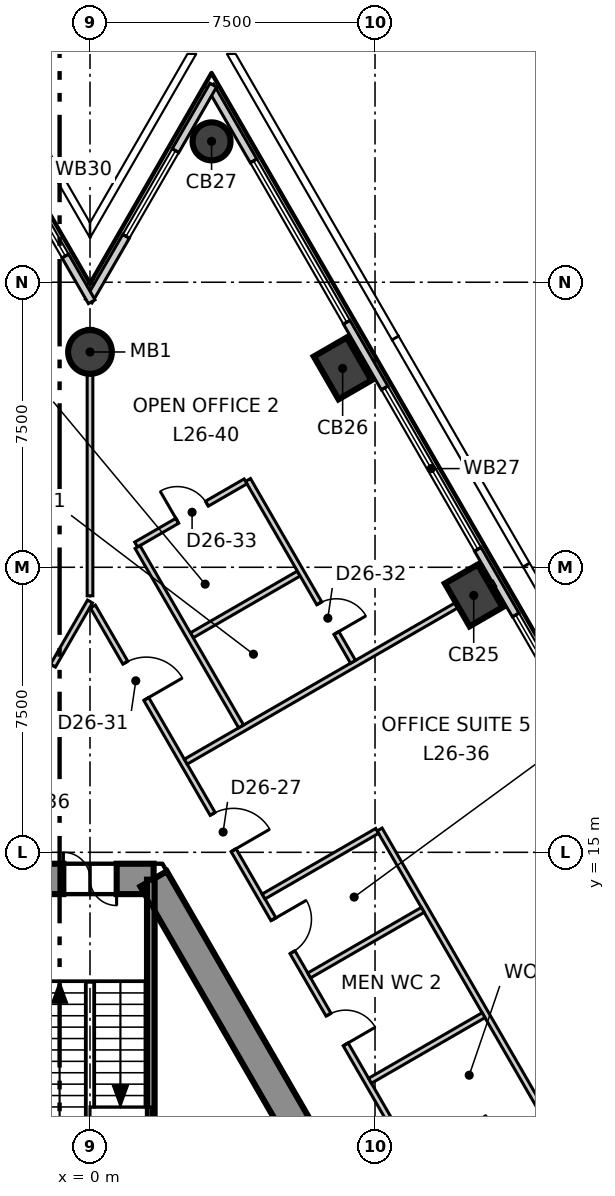
"""IFC4 building model, lengths in metres.
Left out: names, types, materials, properties, quantities, classifications, styles, units other than length and angle.
Written with IfcOpenShell. Run it as: python <this file> out.ifc"""

import sys

from ifc_helpers import new_model, si_unit, direction, frame, frame_2d, origin, origin_2d, place, context, subcontext, project, spatial, polyline, rectangle, circle, outline, extrude, element, fill, save


model = new_model("IFC4")
c1 = context("Model", 3, precision=1e-05, world=origin(), true_north=direction((0.0, 1.0)))
c2 = subcontext(c1, "Body", "Model", "MODEL_VIEW")
j1 = project(units=[si_unit("LENGTHUNIT", "METRE"), si_unit("PLANEANGLEUNIT", "RADIAN")], contexts=[c1])
p1 = place(None, origin())
s1 = spatial("IfcSite", under=j1, at=p1, CompositionType="ELEMENT")
p2 = place(p1, origin())
s2 = spatial("IfcBuilding", under=s1, at=p2, CompositionType="ELEMENT")
p3 = place(p2, frame((0.0, 0.0, 116.3)))
s3 = spatial("IfcBuildingStorey", under=s2, at=p3, CompositionType="ELEMENT", Elevation=116.3)
p4 = place(p3, frame((1.674, 14.3, -0.3), z_axis=(0.0, 0.0, 1.0), x_axis=(-1.0, 0.0, 0.0)))
e1 = element("IfcWall", 1, at=p4, inside=s3, PredefinedType="SHEAR", context=c2, shape_type="SweptSolid", body=[
    extrude(outline(polyline([(-0.231, -0.4), (1.674, -0.4), (3.579, -0.4), (3.117, 0.4), (1.674, 0.4), (0.231, 0.4), (-0.231, -0.4)])), origin(), (0.0, 0.0, 1.0), 4.0),
])
p5 = place(p4, frame((0.974, 0.0, 0.3)))
e2 = element("IfcOpeningElement", 2, at=p5, cuts=e1, PredefinedType="OPENING", context=c2, shape_type="SweptSolid", body=[
    extrude(rectangle(XDim=1.4, YDim=2.1, at=frame_2d((0.7, 1.05))), frame((0.0, 0.41, 0.0), z_axis=(0.0, -1.0, 0.0), x_axis=(1.0, 0.0, 0.0)), (0.0, 0.0, 1.0), 0.82),
])
p6 = place(p3, frame((13.221, -5.7, -0.3), z_axis=(0.0, 0.0, 1.0), x_axis=(-0.499995765644, 0.866027848477, 0.0)))
e3 = element("IfcWall", 3, at=p6, inside=s3, PredefinedType="SHEAR", context=c2, shape_type="SweptSolid", body=[
    extrude(outline(polyline([(-0.231, -0.4), (1.732, -0.4), (3.695, -0.4), (5.658, -0.4), (7.621, -0.4), (9.584, -0.4), (11.547, -0.4), (13.51, -0.4), (15.473, -0.4), (17.436, -0.4), (19.399, -0.4), (21.362, -0.4), (23.325, -0.4), (22.863, 0.4), (20.977, 0.4), (19.091, 0.4), (17.205, 0.4), (15.319, 0.4), (13.433, 0.4), (11.547, 0.4), (9.661, 0.4), (7.775, 0.4), (5.889, 0.4), (4.003, 0.4), (2.117, 0.4), (0.231, 0.4), (-0.231, -0.4)])), origin(), (0.0, 0.0, 1.0), 4.0),
])
p7 = place(p6, frame((10.647, 0.0, 0.3)))
e4 = element("IfcOpeningElement", 4, at=p7, cuts=e3, PredefinedType="OPENING", context=c2, shape_type="SweptSolid", body=[
    extrude(rectangle(XDim=1.8, YDim=2.1, at=frame_2d((0.9, 1.05))), frame((0.0, 0.41, 0.0), z_axis=(0.0, -1.0, 0.0), x_axis=(1.0, 0.0, 0.0)), (0.0, 0.0, 1.0), 0.82),
])
for number, where, z_axis, x_axis in (
    (5, (10.097, 21.76, -0.3), (0.0, 0.0, 1.0), (-0.5, 0.866, 0.0)),
    (6, (6.648, 27.733, -0.3), (0.0, 0.0, 1.0), (-0.5, 0.866, 0.0)),
):
    element("IfcColumn", number, at=place(p3, frame(where, z_axis=z_axis, x_axis=x_axis)), inside=s3, PredefinedType="COLUMN", context=c2, shape_type="SweptSolid", body=[
        extrude(rectangle(XDim=1.3, YDim=1.0, at=origin_2d()), origin(), (0.0, 0.0, 1.0), 4.0),
    ])
p8 = place(p3, frame((3.199, 33.707, -0.3), z_axis=(0.0, 0.0, 1.0), x_axis=(-0.5, 0.866025403784, 0.0)))
e7 = element("IfcColumn", 7, at=p8, inside=s3, PredefinedType="COLUMN", context=c2, shape_type="SweptSolid", body=[
    extrude(circle(Radius=0.5, at=origin_2d()), origin(), (0.0, 0.0, 1.0), 4.0),
])
p9 = place(p3, frame((0.0, 28.165, -0.3), z_axis=(0.0, 0.0, 1.0), x_axis=(1.0, 0.0, 0.0)))
e8 = element("IfcColumn", 8, at=p9, inside=s3, PredefinedType="COLUMN", context=c2, shape_type="SweptSolid", body=[
    extrude(circle(Radius=0.575, at=origin_2d()), origin(), (0.0, 0.0, 1.0), 4.0),
])
p10 = place(p3, frame((32.048, -14.861, 0.0), z_axis=(0.0, 0.0, 1.0), x_axis=(-0.499996704161, 0.866027306629, 0.0)))
e9 = element("IfcWall", 9, at=p10, inside=s3, PredefinedType="ELEMENTEDWALL", context=c2, shape_type="SweptSolid", body=[
    extrude(rectangle(XDim=57.769, YDim=0.2, at=frame_2d((28.884, 0.0))), origin(), (0.0, 0.0, 1.0), 3.7),
])
p11 = place(p10, frame((2.302, 0.0, 0.9)))
e10 = element("IfcOpeningElement", 10, at=p11, cuts=e9, PredefinedType="OPENING", context=c2, shape_type="SweptSolid", body=[
    extrude(rectangle(XDim=4.9, YDim=2.5, at=frame_2d((2.45, 1.25))), frame((0.0, 0.11, 0.0), z_axis=(0.0, -1.0, 0.0), x_axis=(1.0, 0.0, 0.0)), (0.0, 0.0, 1.0), 0.22),
])
p12 = place(p10, frame((9.199, 0.0, 0.9)))
e11 = element("IfcOpeningElement", 11, at=p12, cuts=e9, PredefinedType="OPENING", context=c2, shape_type="SweptSolid", body=[
    extrude(rectangle(XDim=4.9, YDim=2.5, at=frame_2d((2.45, 1.25))), frame((0.0, 0.11, 0.0), z_axis=(0.0, -1.0, 0.0), x_axis=(1.0, 0.0, 0.0)), (0.0, 0.0, 1.0), 0.22),
])
p13 = place(p10, frame((16.097, 0.0, 0.9)))
e12 = element("IfcOpeningElement", 12, at=p13, cuts=e9, PredefinedType="OPENING", context=c2, shape_type="SweptSolid", body=[
    extrude(rectangle(XDim=4.9, YDim=2.5, at=frame_2d((2.45, 1.25))), frame((0.0, 0.11, 0.0), z_axis=(0.0, -1.0, 0.0), x_axis=(1.0, 0.0, 0.0)), (0.0, 0.0, 1.0), 0.22),
])
p14 = place(p10, frame((22.995, 0.0, 0.9)))
e13 = element("IfcOpeningElement", 13, at=p14, cuts=e9, PredefinedType="OPENING", context=c2, shape_type="SweptSolid", body=[
    extrude(rectangle(XDim=4.9, YDim=2.5, at=frame_2d((2.45, 1.25))), frame((0.0, 0.11, 0.0), z_axis=(0.0, -1.0, 0.0), x_axis=(1.0, 0.0, 0.0)), (0.0, 0.0, 1.0), 0.22),
])
p15 = place(p10, frame((29.893, 0.0, 0.9)))
e14 = element("IfcOpeningElement", 14, at=p15, cuts=e9, PredefinedType="OPENING", context=c2, shape_type="SweptSolid", body=[
    extrude(rectangle(XDim=4.9, YDim=2.5, at=frame_2d((2.45, 1.25))), frame((0.0, 0.11, 0.0), z_axis=(0.0, -1.0, 0.0), x_axis=(1.0, 0.0, 0.0)), (0.0, 0.0, 1.0), 0.22),
])
p16 = place(p10, frame((36.791, 0.0, 0.9)))
e15 = element("IfcOpeningElement", 15, at=p16, cuts=e9, PredefinedType="OPENING", context=c2, shape_type="SweptSolid", body=[
    extrude(rectangle(XDim=4.9, YDim=2.5, at=frame_2d((2.45, 1.25))), frame((0.0, 0.11, 0.0), z_axis=(0.0, -1.0, 0.0), x_axis=(1.0, 0.0, 0.0)), (0.0, 0.0, 1.0), 0.22),
])
p17 = place(p10, frame((43.689, 0.0, 0.9)))
e16 = element("IfcOpeningElement", 16, at=p17, cuts=e9, PredefinedType="OPENING", context=c2, shape_type="SweptSolid", body=[
    extrude(rectangle(XDim=4.9, YDim=2.5, at=frame_2d((2.45, 1.25))), frame((0.0, 0.11, 0.0), z_axis=(0.0, -1.0, 0.0), x_axis=(1.0, 0.0, 0.0)), (0.0, 0.0, 1.0), 0.22),
])
p18 = place(p10, frame((50.587, 0.0, 0.9)))
e17 = element("IfcOpeningElement", 17, at=p18, cuts=e9, PredefinedType="OPENING", context=c2, shape_type="SweptSolid", body=[
    extrude(rectangle(XDim=4.9, YDim=2.5, at=frame_2d((2.45, 1.25))), frame((0.0, 0.11, 0.0), z_axis=(0.0, -1.0, 0.0), x_axis=(1.0, 0.0, 0.0)), (0.0, 0.0, 1.0), 0.22),
])
p19 = place(p3, frame((3.244, 35.185, 0.0), z_axis=(0.0, 0.0, 1.0), x_axis=(-0.499862072928, -0.866105021373, 0.0)))
e18 = element("IfcWall", 18, at=p19, inside=s3, PredefinedType="ELEMENTEDWALL", context=c2, shape_type="SweptSolid", body=[
    extrude(rectangle(XDim=6.559, YDim=0.2, at=frame_2d((3.28, 0.0))), origin(), (0.0, 0.0, 1.0), 3.7),
])
p20 = place(p19, frame((1.99, 0.0, 0.9)))
e19 = element("IfcOpeningElement", 19, at=p20, cuts=e18, PredefinedType="OPENING", context=c2, shape_type="SweptSolid", body=[
    extrude(rectangle(XDim=2.6, YDim=2.5, at=frame_2d((1.3, 1.25))), frame((0.0, 0.11, 0.0), z_axis=(0.0, -1.0, 0.0), x_axis=(1.0, 0.0, 0.0)), (0.0, 0.0, 1.0), 0.22),
])
p21 = place(p3, frame((0.045, 29.487, 0.0), z_axis=(0.0, 0.0, 1.0), x_axis=(-0.499878187048, 0.866095721103, 0.0)))
e20 = element("IfcWall", 20, at=p21, inside=s3, PredefinedType="ELEMENTEDWALL", context=c2, shape_type="SweptSolid", body=[
    extrude(rectangle(XDim=6.559, YDim=0.2, at=frame_2d((3.28, 0.0))), origin(), (0.0, 0.0, 1.0), 3.7),
])
p22 = place(p21, frame((1.39, 0.0, 0.9)))
e21 = element("IfcOpeningElement", 21, at=p22, cuts=e20, PredefinedType="OPENING", context=c2, shape_type="SweptSolid", body=[
    extrude(rectangle(XDim=2.6, YDim=2.5, at=frame_2d((1.3, 1.25))), frame((0.0, 0.11, 0.0), z_axis=(0.0, -1.0, 0.0), x_axis=(1.0, 0.0, 0.0)), (0.0, 0.0, 1.0), 0.22),
])
p23 = place(p3, frame((-5.454, 12.154, 0.0), z_axis=(0.0, 0.0, 1.0), x_axis=(0.500029221456, 0.866008532111, 0.0)))
e22 = element("IfcWall", 22, at=p23, inside=s3, PredefinedType="PARTITIONING", context=c2, shape_type="SweptSolid", body=[
    extrude(rectangle(XDim=10.907, YDim=0.15, at=frame_2d((5.454, 0.0))), origin(), (0.0, 0.0, 1.0), 3.7),
])
p24 = place(p23, frame((7.857, 0.0, 0.0)))
e23 = element("IfcOpeningElement", 23, at=p24, cuts=e22, PredefinedType="OPENING", context=c2, shape_type="SweptSolid", body=[
    extrude(rectangle(XDim=1.1, YDim=2.1, at=frame_2d((0.55, 1.05))), frame((0.0, 0.085, 0.0), z_axis=(0.0, -1.0, 0.0), x_axis=(1.0, 0.0, 0.0)), (0.0, 0.0, 1.0), 0.17),
])
p25 = place(p23, frame((2.248, 0.0, 0.0)))
e24 = element("IfcOpeningElement", 24, at=p25, cuts=e22, PredefinedType="OPENING", context=c2, shape_type="SweptSolid", body=[
    extrude(rectangle(XDim=1.0, YDim=2.1, at=frame_2d((0.5, 1.05))), frame((0.0, 0.085, 0.0), z_axis=(0.0, -1.0, 0.0), x_axis=(1.0, 0.0, 0.0)), (0.0, 0.0, 1.0), 0.17),
])
p26 = place(p23, frame((4.348, 0.0, 0.0)))
e25 = element("IfcOpeningElement", 25, at=p26, cuts=e22, PredefinedType="OPENING", context=c2, shape_type="SweptSolid", body=[
    extrude(rectangle(XDim=0.9, YDim=2.1, at=frame_2d((0.45, 1.05))), frame((0.0, 0.085, 0.0), z_axis=(0.0, -1.0, 0.0), x_axis=(1.0, 0.0, 0.0)), (0.0, 0.0, 1.0), 0.17),
])
p27 = place(p3, frame((0.0, 21.75, 0.0), z_axis=(0.0, 0.0, 1.0), x_axis=(0.0, 1.0, 0.0)))
e26 = element("IfcWall", 26, at=p27, inside=s3, PredefinedType="PARTITIONING", context=c2, shape_type="SweptSolid", body=[
    extrude(rectangle(XDim=7.035, YDim=0.15, at=frame_2d((3.518, 0.0))), origin(), (0.0, 0.0, 1.0), 3.15),
])
p28 = place(p3, frame((0.076, 21.468, 0.0), z_axis=(0.0, 0.0, 1.0), x_axis=(0.500006592492, -0.866021597574, 0.0)))
e27 = element("IfcWall", 27, at=p28, inside=s3, PredefinedType="PARTITIONING", context=c2, shape_type="SweptSolid", body=[
    extrude(rectangle(XDim=17.652, YDim=0.15, at=frame_2d((8.826, 0.0))), origin(), (0.0, 0.0, 1.0), 3.7),
])
p29 = place(p28, frame((6.303, 0.0, 0.0)))
e28 = element("IfcOpeningElement", 28, at=p29, cuts=e27, PredefinedType="OPENING", context=c2, shape_type="SweptSolid", body=[
    extrude(rectangle(XDim=1.1, YDim=2.1, at=frame_2d((0.55, 1.05))), frame((0.0, 0.085, 0.0), z_axis=(0.0, -1.0, 0.0), x_axis=(1.0, 0.0, 0.0)), (0.0, 0.0, 1.0), 0.17),
])
p30 = place(p28, frame((12.403, 0.0, 0.0)))
e29 = element("IfcOpeningElement", 29, at=p30, cuts=e27, PredefinedType="OPENING", context=c2, shape_type="SweptSolid", body=[
    extrude(rectangle(XDim=0.9, YDim=2.1, at=frame_2d((0.45, 1.05))), frame((0.0, 0.085, 0.0), z_axis=(0.0, -1.0, 0.0), x_axis=(1.0, 0.0, 0.0)), (0.0, 0.0, 1.0), 0.17),
])
p31 = place(p28, frame((9.503, 0.0, 0.0)))
e30 = element("IfcOpeningElement", 30, at=p31, cuts=e27, PredefinedType="OPENING", context=c2, shape_type="SweptSolid", body=[
    extrude(rectangle(XDim=1.0, YDim=2.1, at=frame_2d((0.5, 1.05))), frame((0.0, 0.085, 0.0), z_axis=(0.0, -1.0, 0.0), x_axis=(1.0, 0.0, 0.0)), (0.0, 0.0, 1.0), 0.17),
])
p32 = place(p28, frame((1.708, 0.0, 0.0)))
e31 = element("IfcOpeningElement", 31, at=p32, cuts=e27, PredefinedType="OPENING", context=c2, shape_type="SweptSolid", body=[
    extrude(rectangle(XDim=1.1, YDim=2.1, at=frame_2d((0.55, 1.05))), frame((0.0, 0.085, 0.0), z_axis=(0.0, -1.0, 0.0), x_axis=(1.0, 0.0, 0.0)), (0.0, 0.0, 1.0), 0.17),
])
p33 = place(p3, frame((2.52, 17.385, 0.0), z_axis=(0.0, 0.0, 1.0), x_axis=(0.866005502057, 0.500034469219, 0.0)))
e32 = element("IfcWall", 32, at=p33, inside=s3, PredefinedType="PARTITIONING", context=c2, shape_type="SweptSolid", body=[
    extrude(rectangle(XDim=9.369, YDim=0.15, at=frame_2d((4.685, 0.0))), origin(), (0.0, 0.0, 1.0), 3.7),
])
p34 = place(p3, frame((7.621, 15.601, 0.0), z_axis=(0.0, 0.0, 1.0), x_axis=(0.499937230245, -0.866061640887, 0.0)))
e33 = element("IfcWall", 33, at=p34, inside=s3, PredefinedType="PARTITIONING", context=c2, shape_type="SweptSolid", body=[
    extrude(rectangle(XDim=8.725, YDim=0.15, at=frame_2d((4.362, 0.0))), origin(), (0.0, 0.0, 1.0), 3.7),
])
p35 = place(p3, frame((4.568, 13.838, 0.0), z_axis=(0.0, 0.0, 1.0), x_axis=(0.866013532718, 0.500020560727, 0.0)))
e34 = element("IfcWall", 34, at=p35, inside=s3, PredefinedType="PARTITIONING", context=c2, shape_type="SweptSolid", body=[
    extrude(rectangle(XDim=3.45, YDim=0.15, at=frame_2d((1.725, 0.0))), origin(), (0.0, 0.0, 1.0), 3.7),
])
for number, where, z_axis, x_axis in (
    (35, (5.768, 11.76, 0.0), (0.0, 0.0, 1.0), (0.866, 0.5, 0.0)),
    (36, (7.368, 8.989, 0.0), (0.0, 0.0, 1.0), (0.866, 0.5, 0.0)),
):
    element("IfcWall", number, at=place(p3, frame(where, z_axis=z_axis, x_axis=x_axis)), inside=s3, PredefinedType="PARTITIONING", context=c2, shape_type="SweptSolid", body=[
        extrude(rectangle(XDim=3.45, YDim=0.15, at=frame_2d((1.725, 0.0))), origin(), (0.0, 0.0, 1.0), 3.7),
    ])
p36 = place(p3, frame((8.969, 6.218, 0.0), z_axis=(0.0, 0.0, 1.0), x_axis=(0.865997263264, 0.500048737644, 0.0)))
e37 = element("IfcWall", 37, at=p36, inside=s3, PredefinedType="PARTITIONING", context=c2, shape_type="SweptSolid", body=[
    extrude(rectangle(XDim=4.124, YDim=0.15, at=frame_2d((2.062, 0.0))), origin(), (0.0, 0.0, 1.0), 3.7),
])
p37 = place(p36, frame((1.274, 0.0, 0.0)))
e38 = element("IfcOpeningElement", 38, at=p37, cuts=e37, PredefinedType="OPENING", context=c2, shape_type="SweptSolid", body=[
    extrude(rectangle(XDim=0.9, YDim=2.1, at=frame_2d((0.45, 1.05))), frame((0.0, 0.085, 0.0), z_axis=(0.0, -1.0, 0.0), x_axis=(1.0, 0.0, 0.0)), (0.0, 0.0, 1.0), 0.17),
])
p38 = place(p3, frame((2.679, 20.71, 0.0), z_axis=(0.0, 0.0, 1.0), x_axis=(0.865977875238, 0.500082312822, 0.0)))
e39 = element("IfcWall", 39, at=p38, inside=s3, PredefinedType="PARTITIONING", context=c2, shape_type="SweptSolid", body=[
    extrude(rectangle(XDim=3.25, YDim=0.15, at=frame_2d((1.625, 0.0))), origin(), (0.0, 0.0, 1.0), 3.7),
])
p39 = place(p3, frame((4.158, 24.798, 0.0), z_axis=(0.0, 0.0, 1.0), x_axis=(0.5000309746, -0.866007519852, 0.0)))
e40 = element("IfcWall", 40, at=p39, inside=s3, PredefinedType="PARTITIONING", context=c2, shape_type="SweptSolid", body=[
    extrude(rectangle(XDim=5.526, YDim=0.15, at=frame_2d((2.763, 0.0))), origin(), (0.0, 0.0, 1.0), 3.7),
])
p40 = place(p39, frame((3.75, 0.0, 0.0)))
e41 = element("IfcOpeningElement", 41, at=p40, cuts=e40, PredefinedType="OPENING", context=c2, shape_type="SweptSolid", body=[
    extrude(rectangle(XDim=0.9, YDim=2.1, at=frame_2d((0.45, 1.05))), frame((0.0, 0.085, 0.0), z_axis=(0.0, -1.0, 0.0), x_axis=(1.0, 0.0, 0.0)), (0.0, 0.0, 1.0), 0.17),
])
p41 = place(p3, frame((1.214, 23.098, 0.0), z_axis=(0.0, 0.0, 1.0), x_axis=(0.866029041019, 0.499993700073, 0.0)))
e42 = element("IfcWall", 42, at=p41, inside=s3, PredefinedType="PARTITIONING", context=c2, shape_type="SweptSolid", body=[
    extrude(rectangle(XDim=3.324, YDim=0.15, at=frame_2d((1.662, 0.0))), origin(), (0.0, 0.0, 1.0), 3.7),
])
p42 = place(p41, frame((1.25, 0.0, 0.0)))
e43 = element("IfcOpeningElement", 43, at=p42, cuts=e42, PredefinedType="OPENING", context=c2, shape_type="SweptSolid", body=[
    extrude(rectangle(XDim=0.9, YDim=2.1, at=frame_2d((0.45, 1.05))), frame((0.0, 0.085, 0.0), z_axis=(0.0, -1.0, 0.0), x_axis=(1.0, 0.0, 0.0)), (0.0, 0.0, 1.0), 0.17),
])
p43 = place(p3, frame((1.251, 23.033, 0.0), z_axis=(0.0, 0.0, 1.0), x_axis=(0.500002931134, -0.866023711487, 0.0)))
e44 = element("IfcWall", 44, at=p43, inside=s3, PredefinedType="PARTITIONING", context=c2, shape_type="SweptSolid", body=[
    extrude(rectangle(XDim=5.45, YDim=0.15, at=frame_2d((2.725, 0.0))), origin(), (0.0, 0.0, 1.0), 3.7),
])
p44 = place(p3, frame((1.6, 6.615, 0.0), z_axis=(0.0, 0.0, 1.0), x_axis=(0.0, 1.0, 0.0)))
e45 = element("IfcWall", 45, at=p44, inside=s3, PredefinedType="SOLIDWALL", context=c2, shape_type="SweptSolid", body=[
    extrude(rectangle(XDim=7.665, YDim=0.2, at=frame_2d((3.833, 0.0))), origin(), (0.0, 0.0, 1.0), 3.7),
])
p45 = place(p16, origin())
e46 = element("IfcWindow", 46, at=p45, inside=s3, PartitioningType="SINGLE_PANEL", PredefinedType="WINDOW", context=c2, shape_type="SweptSolid", body=[
    extrude(rectangle(XDim=4.9, YDim=2.5, at=frame_2d((2.45, 1.25))), frame((0.0, 0.03, 0.0), z_axis=(0.0, -1.0, 0.0), x_axis=(1.0, 0.0, 0.0)), (0.0, 0.0, 1.0), 0.06),
])
fill(e15, e46)
p46 = place(p17, origin())
e47 = element("IfcWindow", 47, at=p46, inside=s3, PartitioningType="SINGLE_PANEL", PredefinedType="WINDOW", context=c2, shape_type="SweptSolid", body=[
    extrude(rectangle(XDim=4.9, YDim=2.5, at=frame_2d((2.45, 1.25))), frame((0.0, 0.03, 0.0), z_axis=(0.0, -1.0, 0.0), x_axis=(1.0, 0.0, 0.0)), (0.0, 0.0, 1.0), 0.06),
])
fill(e16, e47)
p47 = place(p18, origin())
e48 = element("IfcWindow", 48, at=p47, inside=s3, PartitioningType="SINGLE_PANEL", PredefinedType="WINDOW", context=c2, shape_type="SweptSolid", body=[
    extrude(rectangle(XDim=4.9, YDim=2.5, at=frame_2d((2.45, 1.25))), frame((0.0, 0.03, 0.0), z_axis=(0.0, -1.0, 0.0), x_axis=(1.0, 0.0, 0.0)), (0.0, 0.0, 1.0), 0.06),
])
fill(e17, e48)
p48 = place(p20, origin())
e49 = element("IfcWindow", 49, at=p48, inside=s3, PartitioningType="SINGLE_PANEL", PredefinedType="WINDOW", context=c2, shape_type="SweptSolid", body=[
    extrude(rectangle(XDim=2.6, YDim=2.5, at=frame_2d((1.3, 1.25))), frame((0.0, 0.03, 0.0), z_axis=(0.0, -1.0, 0.0), x_axis=(1.0, 0.0, 0.0)), (0.0, 0.0, 1.0), 0.06),
])
fill(e19, e49)
p49 = place(p22, origin())
e50 = element("IfcWindow", 50, at=p49, inside=s3, PartitioningType="SINGLE_PANEL", PredefinedType="WINDOW", context=c2, shape_type="SweptSolid", body=[
    extrude(rectangle(XDim=2.6, YDim=2.5, at=frame_2d((1.3, 1.25))), frame((0.0, 0.03, 0.0), z_axis=(0.0, -1.0, 0.0), x_axis=(1.0, 0.0, 0.0)), (0.0, 0.0, 1.0), 0.06),
])
fill(e21, e50)
p50 = place(p29, origin())
e51 = element("IfcDoor", 51, at=p50, inside=s3, OperationType="SINGLE_SWING_LEFT", PredefinedType="DOOR", context=c2, shape_type="SweptSolid", body=[
    extrude(rectangle(XDim=1.1, YDim=2.1, at=frame_2d((0.55, 1.05))), frame((0.0, 0.025, 0.0), z_axis=(0.0, -1.0, 0.0), x_axis=(1.0, 0.0, 0.0)), (0.0, 0.0, 1.0), 0.05),
])
fill(e28, e51)
p51 = place(p30, origin())
e52 = element("IfcDoor", 52, at=p51, inside=s3, OperationType="SINGLE_SWING_LEFT", PredefinedType="DOOR", context=c2, shape_type="SweptSolid", body=[
    extrude(rectangle(XDim=0.9, YDim=2.1, at=frame_2d((0.45, 1.05))), frame((0.0, 0.025, 0.0), z_axis=(0.0, -1.0, 0.0), x_axis=(1.0, 0.0, 0.0)), (0.0, 0.0, 1.0), 0.05),
])
fill(e29, e52)
p52 = place(p31, origin())
e53 = element("IfcDoor", 53, at=p52, inside=s3, OperationType="SINGLE_SWING_RIGHT", PredefinedType="DOOR", context=c2, shape_type="SweptSolid", body=[
    extrude(rectangle(XDim=1.0, YDim=2.1, at=frame_2d((0.5, 1.05))), frame((0.0, 0.025, 0.0), z_axis=(0.0, -1.0, 0.0), x_axis=(1.0, 0.0, 0.0)), (0.0, 0.0, 1.0), 0.05),
])
fill(e30, e53)
p53 = place(p32, origin())
e54 = element("IfcDoor", 54, at=p53, inside=s3, OperationType="SINGLE_SWING_LEFT", PredefinedType="DOOR", context=c2, shape_type="SweptSolid", body=[
    extrude(rectangle(XDim=1.1, YDim=2.1, at=frame_2d((0.55, 1.05))), frame((0.0, 0.025, 0.0), z_axis=(0.0, -1.0, 0.0), x_axis=(1.0, 0.0, 0.0)), (0.0, 0.0, 1.0), 0.05),
])
fill(e31, e54)
p54 = place(p40, origin())
e55 = element("IfcDoor", 55, at=p54, inside=s3, OperationType="SINGLE_SWING_LEFT", PredefinedType="DOOR", context=c2, shape_type="SweptSolid", body=[
    extrude(rectangle(XDim=0.9, YDim=2.1, at=frame_2d((0.45, 1.05))), frame((0.0, 0.025, 0.0), z_axis=(0.0, -1.0, 0.0), x_axis=(1.0, 0.0, 0.0)), (0.0, 0.0, 1.0), 0.05),
])
fill(e41, e55)
p55 = place(p42, origin())
e56 = element("IfcDoor", 56, at=p55, inside=s3, OperationType="SINGLE_SWING_RIGHT", PredefinedType="DOOR", context=c2, shape_type="SweptSolid", body=[
    extrude(rectangle(XDim=0.9, YDim=2.1, at=frame_2d((0.45, 1.05))), frame((0.0, 0.025, 0.0), z_axis=(0.0, -1.0, 0.0), x_axis=(1.0, 0.0, 0.0)), (0.0, 0.0, 1.0), 0.05),
])
fill(e43, e56)
p56 = place(p24, origin())
e57 = element("IfcDoor", 57, at=p56, inside=s3, OperationType="SINGLE_SWING_RIGHT", PredefinedType="DOOR", context=c2, shape_type="SweptSolid", body=[
    extrude(rectangle(XDim=1.1, YDim=2.1, at=frame_2d((0.55, 1.05))), frame((0.0, 0.025, 0.0), z_axis=(0.0, -1.0, 0.0), x_axis=(1.0, 0.0, 0.0)), (0.0, 0.0, 1.0), 0.05),
])
fill(e23, e57)
p57 = place(p5, origin())
e58 = element("IfcDoor", 58, at=p57, inside=s3, OperationType="DOUBLE_DOOR_SINGLE_SWING", PredefinedType="DOOR", context=c2, shape_type="SweptSolid", body=[
    extrude(rectangle(XDim=1.4, YDim=2.1, at=frame_2d((0.7, 1.05))), frame((0.0, 0.025, 0.0), z_axis=(0.0, -1.0, 0.0), x_axis=(1.0, 0.0, 0.0)), (0.0, 0.0, 1.0), 0.05),
])
fill(e2, e58)
save(model, sys.argv[1])
